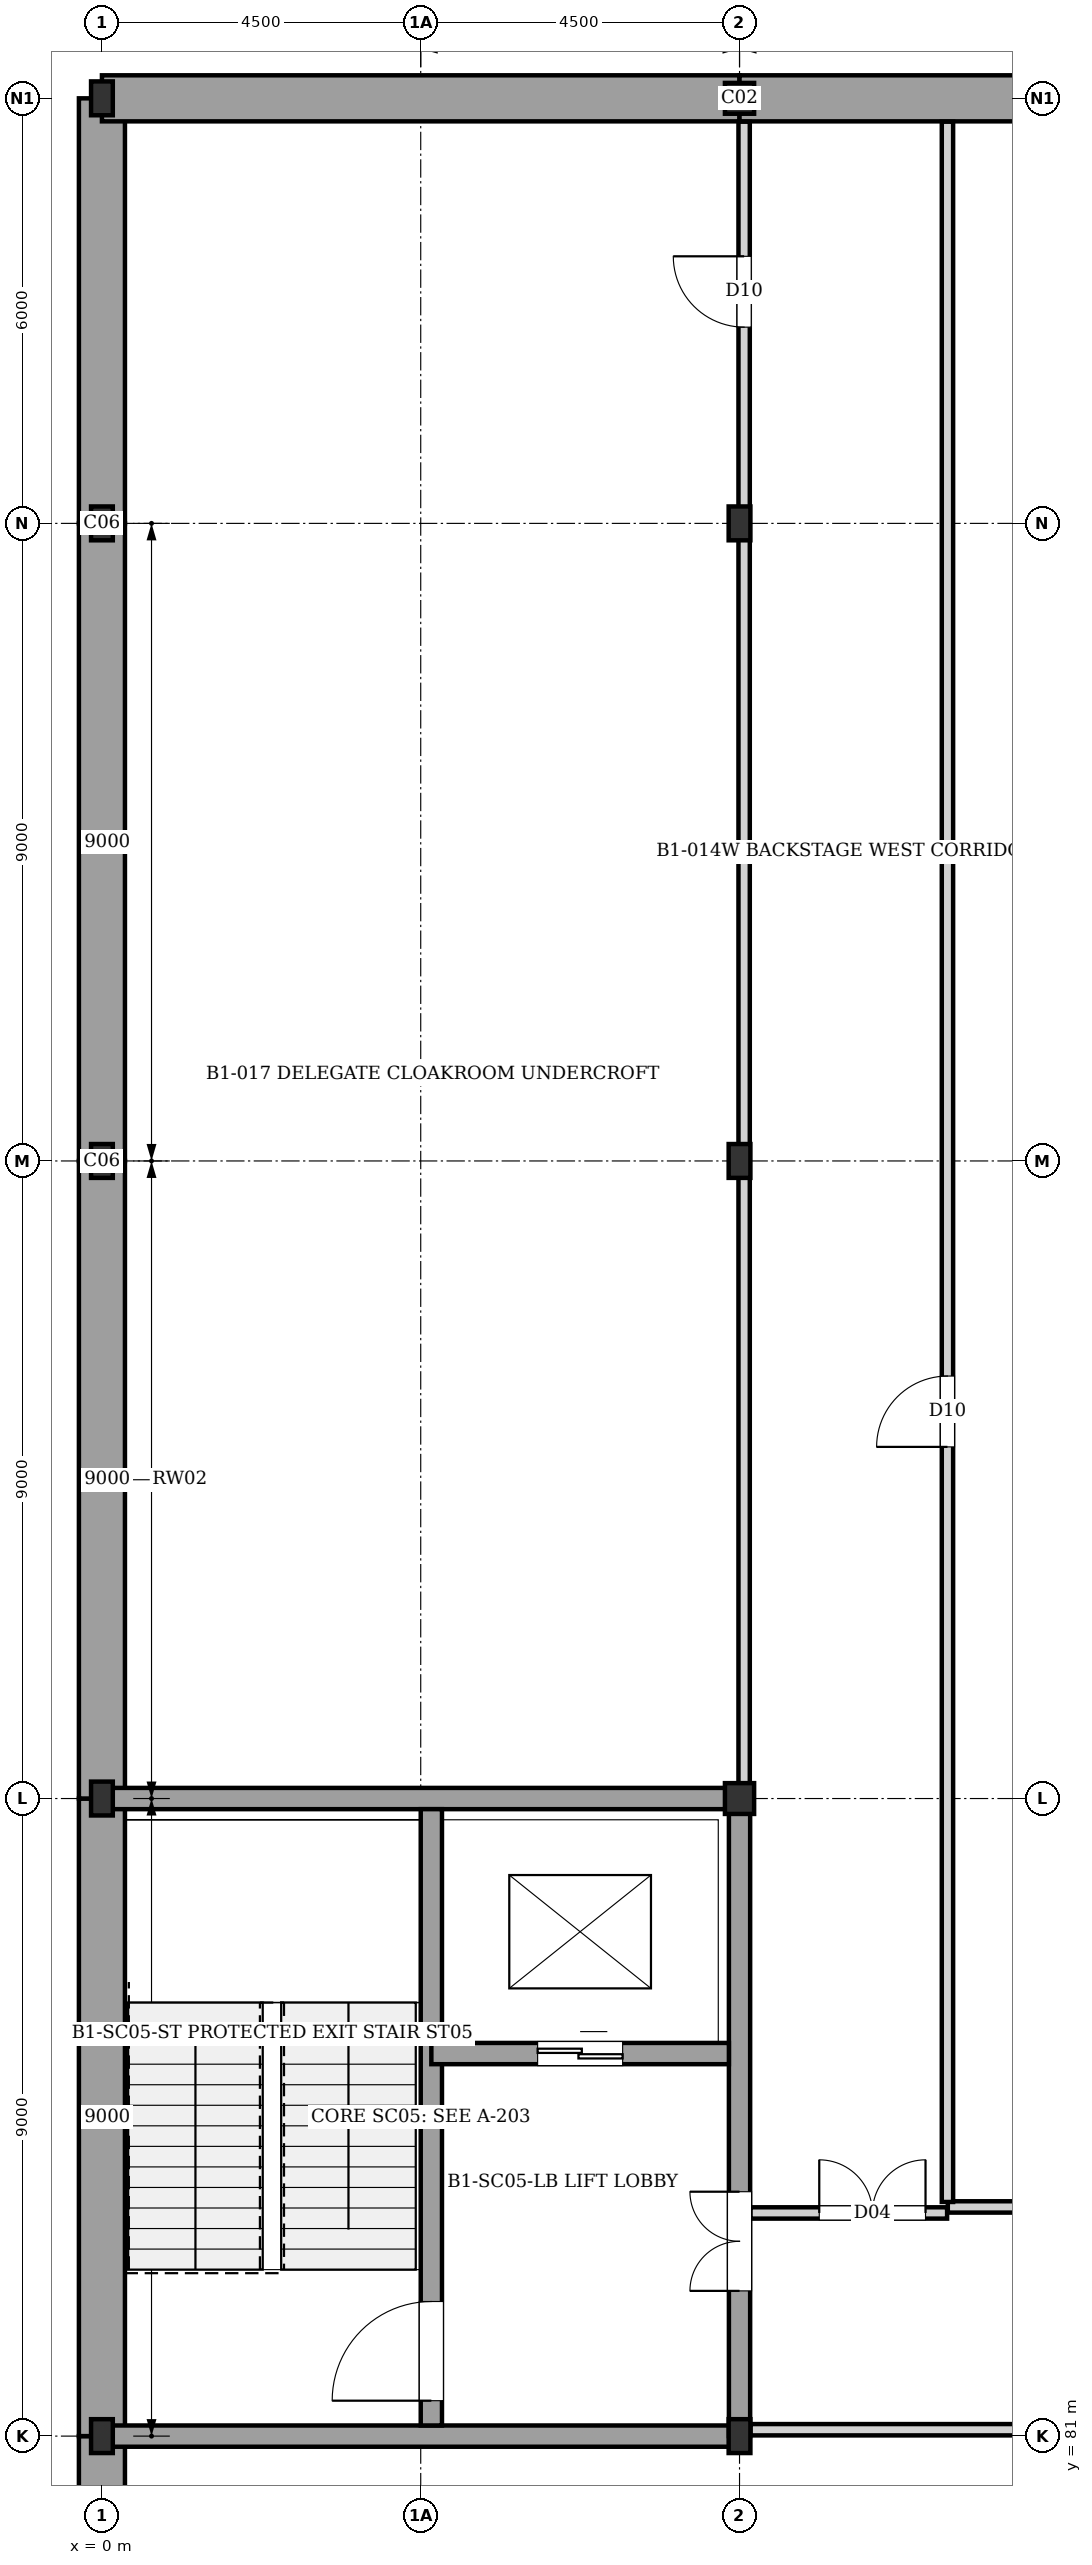
"""IFC4 building model, lengths in metres.
Left out: names, types, materials, properties, quantities, classifications, styles, units other than length and angle.
Written with IfcOpenShell. Run it as: python <this file> out.ifc"""

import sys

from ifc_helpers import new_model, si_unit, direction, frame, frame_2d, origin, origin_2d, place, context, subcontext, project, spatial, rectangle, i_section, extrude, element, fill, save


model = new_model("IFC4")
c1 = context("Model", 3, precision=1e-05, world=origin(), true_north=direction((0.0, 1.0)))
c2 = subcontext(c1, "Body", "Model", "MODEL_VIEW")
j1 = project(units=[si_unit("LENGTHUNIT", "METRE"), si_unit("PLANEANGLEUNIT", "RADIAN")], contexts=[c1])
p1 = place(None, origin())
s1 = spatial("IfcSite", under=j1, at=p1, CompositionType="ELEMENT")
p2 = place(p1, origin())
s2 = spatial("IfcBuilding", under=s1, at=p2, CompositionType="ELEMENT")
p3 = place(p2, frame((0.0, 0.0, -4.48)))
s3 = spatial("IfcBuildingStorey", under=s2, at=p3, CompositionType="ELEMENT", Elevation=-4.48)
for number, where, z_axis, x_axis in (
    (1, (0.0, 81.0, 0.0), (0.0, 0.0, 1.0), (1.0, 0.0, 0.0)),
    (2, (0.0, 90.0, 0.0), (0.0, 0.0, 1.0), (1.0, 0.0, 0.0)),
    (3, (0.0, 99.0, 0.0), (0.0, 0.0, 1.0), (1.0, 0.0, 0.0)),
    (4, (0.0, 108.0, 0.0), (0.0, 0.0, 1.0), (1.0, 0.0, 0.0)),
    (5, (0.0, 114.0, 0.0), (0.0, 0.0, 1.0), (1.0, 0.0, 0.0)),
    (6, (9.0, 81.0, 0.0), (0.0, 0.0, 1.0), (1.0, 0.0, 0.0)),
):
    element("IfcColumn", number, at=place(p3, frame(where, z_axis=z_axis, x_axis=x_axis)), inside=s3, PredefinedType="COLUMN", context=c2, shape_type="SweptSolid", body=[
        extrude(i_section(OverallWidth=0.307, OverallDepth=0.478, WebThickness=0.021, FlangeThickness=0.04, at=origin_2d()), origin(), (0.0, 0.0, 1.0), 4.48),
    ])
p4 = place(p3, frame((9.0, 90.0, 0.0), z_axis=(0.0, 0.0, 1.0), x_axis=(1.0, 0.0, 0.0)))
e7 = element("IfcColumn", 7, at=p4, inside=s3, PredefinedType="COLUMN", context=c2, shape_type="SweptSolid", body=[
    extrude(i_section(OverallWidth=0.412, OverallDepth=0.435, WebThickness=0.027, FlangeThickness=0.046, at=origin_2d()), origin(), (0.0, 0.0, 1.0), 4.48),
])
for number, where, z_axis, x_axis in (
    (8, (9.0, 99.0, 0.0), (0.0, 0.0, 1.0), (1.0, 0.0, 0.0)),
    (9, (9.0, 108.0, 0.0), (0.0, 0.0, 1.0), (1.0, 0.0, 0.0)),
):
    element("IfcColumn", number, at=place(p3, frame(where, z_axis=z_axis, x_axis=x_axis)), inside=s3, PredefinedType="COLUMN", context=c2, shape_type="SweptSolid", body=[
        extrude(i_section(OverallWidth=0.307, OverallDepth=0.478, WebThickness=0.021, FlangeThickness=0.04, at=origin_2d()), origin(), (0.0, 0.0, 1.0), 4.48),
    ])
p5 = place(p3, frame((9.0, 114.0, 0.0), z_axis=(0.0, 0.0, 1.0), x_axis=(1.0, 0.0, 0.0)))
e10 = element("IfcColumn", 10, at=p5, inside=s3, PredefinedType="COLUMN", context=c2, shape_type="SweptSolid", body=[
    extrude(i_section(OverallWidth=0.412, OverallDepth=0.435, WebThickness=0.027, FlangeThickness=0.046, at=origin_2d()), origin(), (0.0, 0.0, 1.0), 4.48),
])
p6 = place(p3, frame((0.0, 72.0, 0.0), z_axis=(0.0, 0.0, 1.0), x_axis=(0.0, 1.0, 0.0)))
e11 = element("IfcWall", 11, at=p6, inside=s3, PredefinedType="USERDEFINED", context=c2, shape_type="SweptSolid", body=[
    extrude(rectangle(XDim=9.0, YDim=0.65, at=frame_2d((4.5, 0.0))), origin(), (0.0, 0.0, 1.0), 4.03),
])
for number, where, z_axis, x_axis in (
    (12, (0.0, 81.0, 0.0), (0.0, 0.0, 1.0), (0.0, 1.0, 0.0)),
    (13, (0.0, 90.0, 0.0), (0.0, 0.0, 1.0), (0.0, 1.0, 0.0)),
    (14, (0.0, 99.0, 0.0), (0.0, 0.0, 1.0), (0.0, 1.0, 0.0)),
):
    element("IfcWall", number, at=place(p3, frame(where, z_axis=z_axis, x_axis=x_axis)), inside=s3, PredefinedType="USERDEFINED", context=c2, shape_type="SweptSolid", body=[
        extrude(rectangle(XDim=9.0, YDim=0.65, at=frame_2d((4.5, 0.0))), origin(), (0.0, 0.0, 1.0), 4.18),
    ])
p7 = place(p3, frame((0.0, 108.0, 0.0), z_axis=(0.0, 0.0, 1.0), x_axis=(0.0, 1.0, 0.0)))
e15 = element("IfcWall", 15, at=p7, inside=s3, PredefinedType="USERDEFINED", context=c2, shape_type="SweptSolid", body=[
    extrude(rectangle(XDim=6.0, YDim=0.65, at=frame_2d((3.0, 0.0))), origin(), (0.0, 0.0, 1.0), 4.18),
])
for number, where, z_axis, x_axis in (
    (16, (0.0, 114.0, 0.0), (0.0, 0.0, 1.0), (1.0, 0.0, 0.0)),
    (17, (9.0, 114.0, 0.0), (0.0, 0.0, 1.0), (1.0, 0.0, 0.0)),
):
    element("IfcWall", number, at=place(p3, frame(where, z_axis=z_axis, x_axis=x_axis)), inside=s3, PredefinedType="USERDEFINED", context=c2, shape_type="SweptSolid", body=[
        extrude(rectangle(XDim=9.0, YDim=0.65, at=frame_2d((4.5, 0.0))), origin(), (0.0, 0.0, 1.0), 4.18),
    ])
p8 = place(p3, frame((0.0, 81.0, 0.0), z_axis=(0.0, 0.0, 1.0), x_axis=(1.0, 0.0, 0.0)))
e18 = element("IfcWall", 18, at=p8, inside=s3, PredefinedType="SHEAR", context=c2, shape_type="SweptSolid", body=[
    extrude(rectangle(XDim=9.0, YDim=0.3, at=frame_2d((4.5, 0.0))), origin(), (0.0, 0.0, 1.0), 4.18),
])
p9 = place(p3, frame((9.0, 81.0, 0.0), z_axis=(0.0, 0.0, 1.0), x_axis=(0.0, 1.0, 0.0)))
e19 = element("IfcWall", 19, at=p9, inside=s3, PredefinedType="SHEAR", context=c2, shape_type="SweptSolid", body=[
    extrude(rectangle(XDim=9.0, YDim=0.3, at=frame_2d((4.5, 0.0))), origin(), (0.0, 0.0, 1.0), 4.18),
])
p10 = place(p9, frame((2.05, 0.0, 0.0)))
e20 = element("IfcOpeningElement", 20, at=p10, cuts=e19, PredefinedType="OPENING", context=c2, shape_type="SweptSolid", body=[
    extrude(rectangle(XDim=1.4, YDim=2.02, at=frame_2d((0.7, 1.01))), frame((0.0, 0.16, 0.0), z_axis=(0.0, -1.0, 0.0), x_axis=(1.0, 0.0, 0.0)), (0.0, 0.0, 1.0), 0.32),
])
p11 = place(p3, frame((0.0, 90.0, 0.0), z_axis=(0.0, 0.0, 1.0), x_axis=(1.0, 0.0, 0.0)))
e21 = element("IfcWall", 21, at=p11, inside=s3, PredefinedType="SHEAR", context=c2, shape_type="SweptSolid", body=[
    extrude(rectangle(XDim=9.0, YDim=0.3, at=frame_2d((4.5, 0.0))), origin(), (0.0, 0.0, 1.0), 4.18),
])
p12 = place(p3, frame((4.65, 81.15, 0.0), z_axis=(0.0, 0.0, 1.0), x_axis=(0.0, 1.0, 0.0)))
e22 = element("IfcWall", 22, at=p12, inside=s3, PredefinedType="SHEAR", context=c2, shape_type="SweptSolid", body=[
    extrude(rectangle(XDim=8.7, YDim=0.3, at=frame_2d((4.35, 0.0))), origin(), (0.0, 0.0, 1.0), 4.18),
])
p13 = place(p12, frame((0.35, 0.0, 0.0)))
e23 = element("IfcOpeningElement", 23, at=p13, cuts=e22, PredefinedType="OPENING", context=c2, shape_type="SweptSolid", body=[
    extrude(rectangle(XDim=1.4, YDim=2.02, at=frame_2d((0.7, 1.01))), frame((0.0, 0.16, 0.0), z_axis=(0.0, -1.0, 0.0), x_axis=(1.0, 0.0, 0.0)), (0.0, 0.0, 1.0), 0.32),
])
p14 = place(p3, frame((4.65, 86.4, 0.0), z_axis=(0.0, 0.0, 1.0), x_axis=(1.0, 0.0, 0.0)))
e24 = element("IfcWall", 24, at=p14, inside=s3, PredefinedType="SHEAR", context=c2, shape_type="SweptSolid", body=[
    extrude(rectangle(XDim=4.2, YDim=0.3, at=frame_2d((2.1, 0.0))), origin(), (0.0, 0.0, 1.0), 4.18),
])
p15 = place(p14, frame((1.5, 0.0, 0.0)))
e25 = element("IfcOpeningElement", 25, at=p15, cuts=e24, PredefinedType="OPENING", context=c2, shape_type="SweptSolid", body=[
    extrude(rectangle(XDim=1.2, YDim=2.2, at=frame_2d((0.6, 1.1))), frame((0.0, 0.16, 0.0), z_axis=(0.0, -1.0, 0.0), x_axis=(1.0, 0.0, 0.0)), (0.0, 0.0, 1.0), 0.32),
])
p16 = place(p3, frame((11.94, 84.235, 0.0), z_axis=(0.0, 0.0, 1.0), x_axis=(1.0, 0.0, 0.0)))
e26 = element("IfcWall", 26, at=p16, inside=s3, PredefinedType="PARTITIONING", context=c2, shape_type="SweptSolid", body=[
    extrude(rectangle(XDim=14.99, YDim=0.16, at=frame_2d((7.495, 0.0))), origin(), (0.0, 0.0, 1.0), 4.18),
])
p17 = place(p3, frame((9.155, 84.15, 0.0), z_axis=(0.0, 0.0, 1.0), x_axis=(1.0, 0.0, 0.0)))
e27 = element("IfcWall", 27, at=p17, inside=s3, PredefinedType="PARTITIONING", context=c2, shape_type="SweptSolid", body=[
    extrude(rectangle(XDim=2.775, YDim=0.16, at=frame_2d((1.387, 0.0))), origin(), (0.0, 0.0, 1.0), 4.18),
])
p18 = place(p17, frame((0.97, 0.0, 0.0)))
e28 = element("IfcOpeningElement", 28, at=p18, cuts=e27, PredefinedType="OPENING", context=c2, shape_type="SweptSolid", body=[
    extrude(rectangle(XDim=1.5, YDim=2.1, at=frame_2d((0.75, 1.05))), frame((0.0, 0.09, 0.0), z_axis=(0.0, -1.0, 0.0), x_axis=(1.0, 0.0, 0.0)), (0.0, 0.0, 1.0), 0.18),
])
p19 = place(p3, frame((9.155, 81.09, 0.0), z_axis=(0.0, 0.0, 1.0), x_axis=(1.0, 0.0, 0.0)))
e29 = element("IfcWall", 29, at=p19, inside=s3, PredefinedType="PARTITIONING", context=c2, shape_type="SweptSolid", body=[
    extrude(rectangle(XDim=35.69, YDim=0.16, at=frame_2d((17.845, 0.0))), origin(), (0.0, 0.0, 1.0), 3.28),
])
p20 = place(p19, frame((12.812, 0.0, 0.0)))
e30 = element("IfcOpeningElement", 30, at=p20, cuts=e29, PredefinedType="OPENING", context=c2, shape_type="SweptSolid", body=[
    extrude(rectangle(XDim=1.5, YDim=2.1, at=frame_2d((0.75, 1.05))), frame((0.0, 0.09, 0.0), z_axis=(0.0, -1.0, 0.0), x_axis=(1.0, 0.0, 0.0)), (0.0, 0.0, 1.0), 0.18),
])
p21 = place(p3, frame((11.935, 84.305, 0.0), z_axis=(0.0, 0.0, 1.0), x_axis=(0.0, 1.0, 0.0)))
e31 = element("IfcWall", 31, at=p21, inside=s3, PredefinedType="PARTITIONING", context=c2, shape_type="SweptSolid", body=[
    extrude(rectangle(XDim=29.365, YDim=0.16, at=frame_2d((14.683, 0.0))), origin(), (0.0, 0.0, 1.0), 4.18),
])
p22 = place(p21, frame((10.659, 0.0, 0.0)))
e32 = element("IfcOpeningElement", 32, at=p22, cuts=e31, PredefinedType="OPENING", context=c2, shape_type="SweptSolid", body=[
    extrude(rectangle(XDim=1.0, YDim=2.1, at=frame_2d((0.5, 1.05))), frame((0.0, 0.09, 0.0), z_axis=(0.0, -1.0, 0.0), x_axis=(1.0, 0.0, 0.0)), (0.0, 0.0, 1.0), 0.18),
])
p23 = place(p3, frame((9.065, 90.155, 0.0), z_axis=(0.0, 0.0, 1.0), x_axis=(0.0, 1.0, 0.0)))
e33 = element("IfcWall", 33, at=p23, inside=s3, PredefinedType="PARTITIONING", context=c2, shape_type="SweptSolid", body=[
    extrude(rectangle(XDim=17.865, YDim=0.16, at=frame_2d((8.933, 0.0))), origin(), (0.0, 0.0, 1.0), 3.28),
])
p24 = place(p3, frame((9.065, 108.02, 0.0), z_axis=(0.0, 0.0, 1.0), x_axis=(0.0, 1.0, 0.0)))
e34 = element("IfcWall", 34, at=p24, inside=s3, PredefinedType="PARTITIONING", context=c2, shape_type="SweptSolid", body=[
    extrude(rectangle(XDim=5.65, YDim=0.16, at=frame_2d((2.825, 0.0))), origin(), (0.0, 0.0, 1.0), 3.48),
])
p25 = place(p24, frame((2.75, 0.0, 0.0)))
e35 = element("IfcOpeningElement", 35, at=p25, cuts=e34, PredefinedType="OPENING", context=c2, shape_type="SweptSolid", body=[
    extrude(rectangle(XDim=1.0, YDim=2.1, at=frame_2d((0.5, 1.05))), frame((0.0, 0.09, 0.0), z_axis=(0.0, -1.0, 0.0), x_axis=(1.0, 0.0, 0.0)), (0.0, 0.0, 1.0), 0.18),
])
p26 = place(p10, origin())
e36 = element("IfcDoor", 36, at=p26, inside=s3, OperationType="DOUBLE_DOOR_SINGLE_SWING", PredefinedType="DOOR", context=c2, shape_type="SweptSolid", body=[
    extrude(rectangle(XDim=1.4, YDim=2.02, at=frame_2d((0.7, 1.01))), frame((0.0, 0.025, 0.0), z_axis=(0.0, -1.0, 0.0), x_axis=(1.0, 0.0, 0.0)), (0.0, 0.0, 1.0), 0.05),
])
fill(e20, e36)
p27 = place(p13, origin())
e37 = element("IfcDoor", 37, at=p27, inside=s3, OperationType="SINGLE_SWING_LEFT", PredefinedType="DOOR", context=c2, shape_type="SweptSolid", body=[
    extrude(rectangle(XDim=1.4, YDim=2.02, at=frame_2d((0.7, 1.01))), frame((0.0, 0.025, 0.0), z_axis=(0.0, -1.0, 0.0), x_axis=(1.0, 0.0, 0.0)), (0.0, 0.0, 1.0), 0.05),
])
fill(e23, e37)
p28 = place(p15, origin())
e38 = element("IfcDoor", 38, at=p28, inside=s3, OperationType="DOUBLE_DOOR_SLIDING", PredefinedType="DOOR", context=c2, shape_type="SweptSolid", body=[
    extrude(rectangle(XDim=1.2, YDim=2.2, at=frame_2d((0.6, 1.1))), frame((0.0, 0.025, 0.0), z_axis=(0.0, -1.0, 0.0), x_axis=(1.0, 0.0, 0.0)), (0.0, 0.0, 1.0), 0.05),
])
fill(e25, e38)
p29 = place(p18, origin())
e39 = element("IfcDoor", 39, at=p29, inside=s3, OperationType="DOUBLE_DOOR_SINGLE_SWING", PredefinedType="DOOR", context=c2, shape_type="SweptSolid", body=[
    extrude(rectangle(XDim=1.5, YDim=2.1, at=frame_2d((0.75, 1.05))), frame((0.0, 0.025, 0.0), z_axis=(0.0, -1.0, 0.0), x_axis=(1.0, 0.0, 0.0)), (0.0, 0.0, 1.0), 0.05),
])
fill(e28, e39)
p30 = place(p22, origin())
e40 = element("IfcDoor", 40, at=p30, inside=s3, OperationType="SINGLE_SWING_LEFT", PredefinedType="DOOR", context=c2, shape_type="SweptSolid", body=[
    extrude(rectangle(XDim=1.0, YDim=2.1, at=frame_2d((0.5, 1.05))), frame((0.0, 0.025, 0.0), z_axis=(0.0, -1.0, 0.0), x_axis=(1.0, 0.0, 0.0)), (0.0, 0.0, 1.0), 0.05),
])
fill(e32, e40)
p31 = place(p25, origin())
e41 = element("IfcDoor", 41, at=p31, inside=s3, OperationType="SINGLE_SWING_RIGHT", PredefinedType="DOOR", context=c2, shape_type="SweptSolid", body=[
    extrude(rectangle(XDim=1.0, YDim=2.1, at=frame_2d((0.5, 1.05))), frame((0.0, 0.025, 0.0), z_axis=(0.0, -1.0, 0.0), x_axis=(1.0, 0.0, 0.0)), (0.0, 0.0, 1.0), 0.05),
])
fill(e35, e41)
save(model, sys.argv[1])
